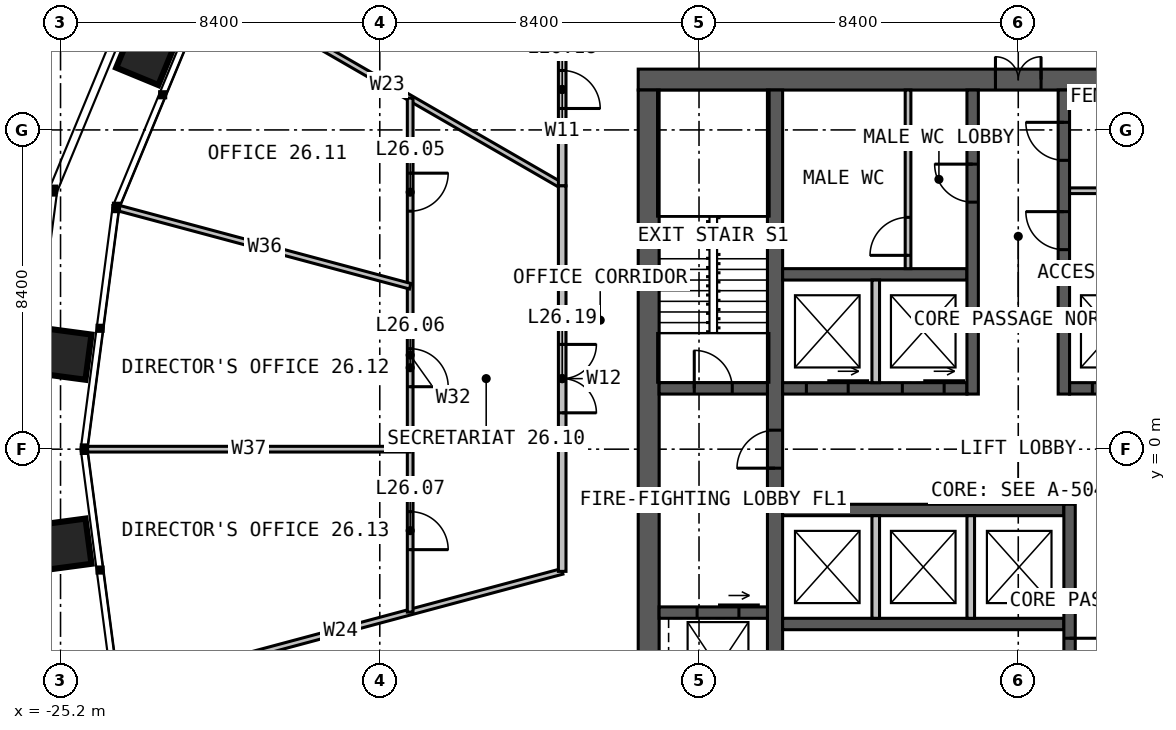
"""IFC4 building model, lengths in metres.
Left out: names, types, materials, properties, quantities, classifications, styles, units other than length and angle.
Written with IfcOpenShell. Run it as: python <this file> out.ifc"""

import sys

from ifc_helpers import new_model, si_unit, direction, frame, frame_2d, origin, place, context, subcontext, project, spatial, rectangle, extrude, element, fill, save


model = new_model("IFC4")
c1 = context("Model", 3, precision=1e-05, world=origin(), true_north=direction((0.0, 1.0)))
c2 = subcontext(c1, "Body", "Model", "MODEL_VIEW")
j1 = project(units=[si_unit("LENGTHUNIT", "METRE"), si_unit("PLANEANGLEUNIT", "RADIAN")], contexts=[c1])
p1 = place(None, origin())
s1 = spatial("IfcSite", under=j1, at=p1, CompositionType="ELEMENT")
p2 = place(p1, origin())
s2 = spatial("IfcBuilding", under=s1, at=p2, CompositionType="ELEMENT")
p3 = place(p2, frame((0.0, 0.0, 110.0)))
s3 = spatial("IfcBuildingStorey", under=s2, at=p3, CompositionType="ELEMENT", Elevation=110.0)
p4 = place(p3, frame((-10.0, 9.725, 0.0), z_axis=(0.0, 0.0, 1.0), x_axis=(1.0, 0.0, 0.0)))
e1 = element("IfcWall", 1, at=p4, inside=s3, PredefinedType="SOLIDWALL", context=c2, shape_type="SweptSolid", body=[
    extrude(rectangle(XDim=20.0, YDim=0.55, at=frame_2d((10.0, 0.0))), origin(), (0.0, 0.0, 1.0), 4.0),
])
p5 = place(p4, frame((9.4, 0.0, 0.0)))
e2 = element("IfcOpeningElement", 2, at=p5, cuts=e1, PredefinedType="OPENING", context=c2, shape_type="SweptSolid", body=[
    extrude(rectangle(XDim=1.2, YDim=2.2, at=frame_2d((0.6, 1.1))), frame((0.0, 0.285, 0.0), z_axis=(0.0, -1.0, 0.0), x_axis=(1.0, 0.0, 0.0)), (0.0, 0.0, 1.0), 0.57),
])
p6 = place(p3, frame((-9.725, 9.45, 0.0), z_axis=(0.0, 0.0, 1.0), x_axis=(0.0, -1.0, 0.0)))
e3 = element("IfcWall", 3, at=p6, inside=s3, PredefinedType="SOLIDWALL", context=c2, shape_type="SweptSolid", body=[
    extrude(rectangle(XDim=18.9, YDim=0.55, at=frame_2d((9.45, 0.0))), origin(), (0.0, 0.0, 1.0), 4.0),
])
p7 = place(p3, frame((-6.4, -9.45, 0.0), z_axis=(0.0, 0.0, 1.0), x_axis=(0.0, 1.0, 0.0)))
e4 = element("IfcWall", 4, at=p7, inside=s3, PredefinedType="SOLIDWALL", context=c2, shape_type="SweptSolid", body=[
    extrude(rectangle(XDim=18.9, YDim=0.4, at=frame_2d((9.45, 0.0))), origin(), (0.0, 0.0, 1.0), 4.0),
])
p8 = place(p7, frame((8.95, 0.0, 0.0)))
e5 = element("IfcOpeningElement", 5, at=p8, cuts=e4, PredefinedType="OPENING", context=c2, shape_type="SweptSolid", body=[
    extrude(rectangle(XDim=1.0, YDim=2.2, at=frame_2d((0.5, 1.1))), frame((0.0, 0.21, 0.0), z_axis=(0.0, -1.0, 0.0), x_axis=(1.0, 0.0, 0.0)), (0.0, 0.0, 1.0), 0.42),
])
p9 = place(p3, frame((-6.2, 1.6, 0.0), z_axis=(0.0, 0.0, 1.0), x_axis=(1.0, 0.0, 0.0)))
e6 = element("IfcWall", 6, at=p9, inside=s3, PredefinedType="SOLIDWALL", context=c2, shape_type="SweptSolid", body=[
    extrude(rectangle(XDim=4.85, YDim=0.3, at=frame_2d((2.425, 0.0))), origin(), (0.0, 0.0, 1.0), 4.0),
])
p10 = place(p9, frame((0.625, 0.0, 0.0)))
e7 = element("IfcOpeningElement", 7, at=p10, cuts=e6, PredefinedType="OPENING", context=c2, shape_type="SweptSolid", body=[
    extrude(rectangle(XDim=1.1, YDim=2.2, at=frame_2d((0.55, 1.1))), frame((0.0, 0.16, 0.0), z_axis=(0.0, -1.0, 0.0), x_axis=(1.0, 0.0, 0.0)), (0.0, 0.0, 1.0), 0.32),
])
p11 = place(p9, frame((3.15, 0.0, 0.0)))
e8 = element("IfcOpeningElement", 8, at=p11, cuts=e6, PredefinedType="OPENING", context=c2, shape_type="SweptSolid", body=[
    extrude(rectangle(XDim=1.1, YDim=2.2, at=frame_2d((0.55, 1.1))), frame((0.0, 0.16, 0.0), z_axis=(0.0, -1.0, 0.0), x_axis=(1.0, 0.0, 0.0)), (0.0, 0.0, 1.0), 0.32),
])
p12 = place(p3, frame((1.35, 1.6, 0.0), z_axis=(0.0, 0.0, 1.0), x_axis=(1.0, 0.0, 0.0)))
e9 = element("IfcWall", 9, at=p12, inside=s3, PredefinedType="SOLIDWALL", context=c2, shape_type="SweptSolid", body=[
    extrude(rectangle(XDim=4.85, YDim=0.3, at=frame_2d((2.425, 0.0))), origin(), (0.0, 0.0, 1.0), 4.0),
])
p13 = place(p12, frame((0.6, 0.0, 0.0)))
e10 = element("IfcOpeningElement", 10, at=p13, cuts=e9, PredefinedType="OPENING", context=c2, shape_type="SweptSolid", body=[
    extrude(rectangle(XDim=1.1, YDim=2.2, at=frame_2d((0.55, 1.1))), frame((0.0, 0.16, 0.0), z_axis=(0.0, -1.0, 0.0), x_axis=(1.0, 0.0, 0.0)), (0.0, 0.0, 1.0), 0.32),
])
p14 = place(p12, frame((3.125, 0.0, 0.0)))
e11 = element("IfcOpeningElement", 11, at=p14, cuts=e9, PredefinedType="OPENING", context=c2, shape_type="SweptSolid", body=[
    extrude(rectangle(XDim=1.1, YDim=2.2, at=frame_2d((0.55, 1.1))), frame((0.0, 0.16, 0.0), z_axis=(0.0, -1.0, 0.0), x_axis=(1.0, 0.0, 0.0)), (0.0, 0.0, 1.0), 0.32),
])
for number, where, z_axis, x_axis in (
    (12, (-6.2, 4.6, 0.0), (0.0, 0.0, 1.0), (1.0, 0.0, 0.0)),
    (13, (1.35, 4.6, 0.0), (0.0, 0.0, 1.0), (1.0, 0.0, 0.0)),
):
    element("IfcWall", number, at=place(p3, frame(where, z_axis=z_axis, x_axis=x_axis)), inside=s3, PredefinedType="SOLIDWALL", context=c2, shape_type="SweptSolid", body=[
        extrude(rectangle(XDim=4.85, YDim=0.3, at=frame_2d((2.425, 0.0))), origin(), (0.0, 0.0, 1.0), 4.0),
    ])
p15 = place(p3, frame((-1.2, 1.45, 0.0), z_axis=(0.0, 0.0, 1.0), x_axis=(0.0, 1.0, 0.0)))
e14 = element("IfcWall", 14, at=p15, inside=s3, PredefinedType="SOLIDWALL", context=c2, shape_type="SweptSolid", body=[
    extrude(rectangle(XDim=8.0, YDim=0.3, at=frame_2d((4.0, 0.0))), origin(), (0.0, 0.0, 1.0), 4.0),
])
p16 = place(p15, frame((5.05, 0.0, 0.0)))
e15 = element("IfcOpeningElement", 15, at=p16, cuts=e14, PredefinedType="OPENING", context=c2, shape_type="SweptSolid", body=[
    extrude(rectangle(XDim=1.0, YDim=2.2, at=frame_2d((0.5, 1.1))), frame((0.0, 0.16, 0.0), z_axis=(0.0, -1.0, 0.0), x_axis=(1.0, 0.0, 0.0)), (0.0, 0.0, 1.0), 0.32),
])
p17 = place(p3, frame((1.2, 1.45, 0.0), z_axis=(0.0, 0.0, 1.0), x_axis=(0.0, 1.0, 0.0)))
e16 = element("IfcWall", 16, at=p17, inside=s3, PredefinedType="SOLIDWALL", context=c2, shape_type="SweptSolid", body=[
    extrude(rectangle(XDim=8.0, YDim=0.3, at=frame_2d((4.0, 0.0))), origin(), (0.0, 0.0, 1.0), 4.0),
])
p18 = place(p17, frame((3.8, 0.0, 0.0)))
e17 = element("IfcOpeningElement", 17, at=p18, cuts=e16, PredefinedType="OPENING", context=c2, shape_type="SweptSolid", body=[
    extrude(rectangle(XDim=1.0, YDim=2.2, at=frame_2d((0.5, 1.1))), frame((0.0, 0.16, 0.0), z_axis=(0.0, -1.0, 0.0), x_axis=(1.0, 0.0, 0.0)), (0.0, 0.0, 1.0), 0.32),
])
p19 = place(p17, frame((6.15, 0.0, 0.0)))
e18 = element("IfcOpeningElement", 18, at=p19, cuts=e16, PredefinedType="OPENING", context=c2, shape_type="SweptSolid", body=[
    extrude(rectangle(XDim=1.0, YDim=2.2, at=frame_2d((0.5, 1.1))), frame((0.0, 0.16, 0.0), z_axis=(0.0, -1.0, 0.0), x_axis=(1.0, 0.0, 0.0)), (0.0, 0.0, 1.0), 0.32),
])
for number, where, z_axis, x_axis in (
    (19, (-6.2, -1.6, 0.0), (0.0, 0.0, 1.0), (1.0, 0.0, 0.0)),
    (20, (-6.2, -4.6, 0.0), (0.0, 0.0, 1.0), (1.0, 0.0, 0.0)),
):
    element("IfcWall", number, at=place(p3, frame(where, z_axis=z_axis, x_axis=x_axis)), inside=s3, PredefinedType="SOLIDWALL", context=c2, shape_type="SweptSolid", body=[
        extrude(rectangle(XDim=7.4, YDim=0.3, at=frame_2d((3.7, 0.0))), origin(), (0.0, 0.0, 1.0), 4.0),
    ])
p20 = place(p3, frame((1.35, -1.45, 0.0), z_axis=(0.0, 0.0, 1.0), x_axis=(0.0, -1.0, 0.0)))
e21 = element("IfcWall", 21, at=p20, inside=s3, PredefinedType="SOLIDWALL", context=c2, shape_type="SweptSolid", body=[
    extrude(rectangle(XDim=8.0, YDim=0.3, at=frame_2d((4.0, 0.0))), origin(), (0.0, 0.0, 1.0), 4.0),
])
p21 = place(p20, frame((5.925, 0.0, 0.0)))
e22 = element("IfcOpeningElement", 22, at=p21, cuts=e21, PredefinedType="OPENING", context=c2, shape_type="SweptSolid", body=[
    extrude(rectangle(XDim=1.0, YDim=2.2, at=frame_2d((0.5, 1.1))), frame((0.0, 0.16, 0.0), z_axis=(0.0, -1.0, 0.0), x_axis=(1.0, 0.0, 0.0)), (0.0, 0.0, 1.0), 0.32),
])
p22 = place(p20, frame((3.525, 0.0, 0.0)))
e23 = element("IfcOpeningElement", 23, at=p22, cuts=e21, PredefinedType="OPENING", context=c2, shape_type="SweptSolid", body=[
    extrude(rectangle(XDim=0.9, YDim=2.2, at=frame_2d((0.45, 1.1))), frame((0.0, 0.16, 0.0), z_axis=(0.0, -1.0, 0.0), x_axis=(1.0, 0.0, 0.0)), (0.0, 0.0, 1.0), 0.32),
])
p23 = place(p3, frame((-9.45, 1.6, 0.0), z_axis=(0.0, 0.0, 1.0), x_axis=(1.0, 0.0, 0.0)))
e24 = element("IfcWall", 24, at=p23, inside=s3, PredefinedType="SOLIDWALL", context=c2, shape_type="SweptSolid", body=[
    extrude(rectangle(XDim=2.85, YDim=0.3, at=frame_2d((1.425, 0.0))), origin(), (0.0, 0.0, 1.0), 4.0),
])
p24 = place(p23, frame((0.925, 0.0, 0.0)))
e25 = element("IfcOpeningElement", 25, at=p24, cuts=e24, PredefinedType="OPENING", context=c2, shape_type="SweptSolid", body=[
    extrude(rectangle(XDim=1.0, YDim=2.2, at=frame_2d((0.5, 1.1))), frame((0.0, 0.16, 0.0), z_axis=(0.0, -1.0, 0.0), x_axis=(1.0, 0.0, 0.0)), (0.0, 0.0, 1.0), 0.32),
])
p25 = place(p3, frame((-9.45, -4.3, 0.0), z_axis=(0.0, 0.0, 1.0), x_axis=(1.0, 0.0, 0.0)))
e26 = element("IfcWall", 26, at=p25, inside=s3, PredefinedType="SOLIDWALL", context=c2, shape_type="SweptSolid", body=[
    extrude(rectangle(XDim=2.85, YDim=0.3, at=frame_2d((1.425, 0.0))), origin(), (0.0, 0.0, 1.0), 4.0),
])
p26 = place(p25, frame((1.0, 0.0, 0.0)))
e27 = element("IfcOpeningElement", 27, at=p26, cuts=e26, PredefinedType="OPENING", context=c2, shape_type="SweptSolid", body=[
    extrude(rectangle(XDim=1.1, YDim=2.2, at=frame_2d((0.55, 1.1))), frame((0.0, 0.16, 0.0), z_axis=(0.0, -1.0, 0.0), x_axis=(1.0, 0.0, 0.0)), (0.0, 0.0, 1.0), 0.32),
])
for number, where, z_axis, x_axis in (
    (28, (-3.75, 1.75, 0.0), (0.0, 0.0, 1.0), (0.0, 1.0, 0.0)),
    (29, (-3.75, -1.75, 0.0), (0.0, 0.0, 1.0), (0.0, -1.0, 0.0)),
    (30, (-1.25, -1.75, 0.0), (0.0, 0.0, 1.0), (0.0, -1.0, 0.0)),
):
    element("IfcWall", number, at=place(p3, frame(where, z_axis=z_axis, x_axis=x_axis)), inside=s3, PredefinedType="SOLIDWALL", context=c2, shape_type="SweptSolid", body=[
        extrude(rectangle(XDim=2.7, YDim=0.2, at=frame_2d((1.35, 0.0))), origin(), (0.0, 0.0, 1.0), 3.75),
    ])
p27 = place(p3, frame((1.35, 6.8, 0.0), z_axis=(0.0, 0.0, 1.0), x_axis=(1.0, 0.0, 0.0)))
e31 = element("IfcWall", 31, at=p27, inside=s3, PredefinedType="PARTITIONING", context=c2, shape_type="SweptSolid", body=[
    extrude(rectangle(XDim=4.85, YDim=0.15, at=frame_2d((2.425, 0.0))), origin(), (0.0, 0.0, 1.0), 3.75),
])
p28 = place(p27, frame((3.15, 0.0, 0.0)))
e32 = element("IfcOpeningElement", 32, at=p28, cuts=e31, PredefinedType="OPENING", context=c2, shape_type="SweptSolid", body=[
    extrude(rectangle(XDim=0.9, YDim=2.2, at=frame_2d((0.45, 1.1))), frame((0.0, 0.085, 0.0), z_axis=(0.0, -1.0, 0.0), x_axis=(1.0, 0.0, 0.0)), (0.0, 0.0, 1.0), 0.17),
])
p29 = place(p3, frame((-2.9, 4.75, 0.0), z_axis=(0.0, 0.0, 1.0), x_axis=(0.0, 1.0, 0.0)))
e33 = element("IfcWall", 33, at=p29, inside=s3, PredefinedType="PARTITIONING", context=c2, shape_type="SweptSolid", body=[
    extrude(rectangle(XDim=4.7, YDim=0.15, at=frame_2d((2.35, 0.0))), origin(), (0.0, 0.0, 1.0), 3.75),
])
p30 = place(p29, frame((0.35, 0.0, 0.0)))
e34 = element("IfcOpeningElement", 34, at=p30, cuts=e33, PredefinedType="OPENING", context=c2, shape_type="SweptSolid", body=[
    extrude(rectangle(XDim=1.0, YDim=2.2, at=frame_2d((0.5, 1.1))), frame((0.0, 0.085, 0.0), z_axis=(0.0, -1.0, 0.0), x_axis=(1.0, 0.0, 0.0)), (0.0, 0.0, 1.0), 0.17),
])
p31 = place(p3, frame((-12.0, 6.928, 0.0), z_axis=(0.0, 0.0, 1.0), x_axis=(-0.866024197053, 0.500002090115, 0.0)))
e35 = element("IfcWall", 35, at=p31, inside=s3, PredefinedType="PARTITIONING", context=c2, shape_type="SweptSolid", body=[
    extrude(rectangle(XDim=10.631, YDim=0.15, at=frame_2d((5.315, 0.0))), origin(), (0.0, 0.0, 1.0), 2.79),
])
p32 = place(p3, frame((-12.0, -3.215, 0.0), z_axis=(0.0, 0.0, 1.0), x_axis=(-0.965926913807, -0.258814986396, 0.0)))
e36 = element("IfcWall", 36, at=p32, inside=s3, PredefinedType="PARTITIONING", context=c2, shape_type="SweptSolid", body=[
    extrude(rectangle(XDim=12.064, YDim=0.15, at=frame_2d((6.032, 0.0))), origin(), (0.0, 0.0, 1.0), 2.79),
])
p33 = place(p3, frame((-12.0, 12.0, 0.0), z_axis=(0.0, 0.0, 1.0), x_axis=(0.0, -1.0, 0.0)))
e37 = element("IfcWall", 37, at=p33, inside=s3, PredefinedType="PARTITIONING", context=c2, shape_type="SweptSolid", body=[
    extrude(rectangle(XDim=5.072, YDim=0.2, at=frame_2d((2.536, 0.0))), origin(), (0.0, 0.0, 1.0), 3.8),
])
p34 = place(p33, frame((2.036, 0.0, 0.0)))
e38 = element("IfcOpeningElement", 38, at=p34, cuts=e37, PredefinedType="OPENING", context=c2, shape_type="SweptSolid", body=[
    extrude(rectangle(XDim=1.0, YDim=2.2, at=frame_2d((0.5, 1.1))), frame((0.0, 0.11, 0.0), z_axis=(0.0, -1.0, 0.0), x_axis=(1.0, 0.0, 0.0)), (0.0, 0.0, 1.0), 0.22),
])
p35 = place(p3, frame((-16.0, 9.238, 0.0), z_axis=(0.0, 0.0, 1.0), x_axis=(0.0, -1.0, 0.0)))
e39 = element("IfcWall", 39, at=p35, inside=s3, PredefinedType="PARTITIONING", context=c2, shape_type="SweptSolid", body=[
    extrude(rectangle(XDim=13.525, YDim=0.15, at=frame_2d((6.762, 0.0))), origin(), (0.0, 0.0, 1.0), 2.79),
])
p36 = place(p35, frame((1.975, 0.0, 0.0)))
e40 = element("IfcOpeningElement", 40, at=p36, cuts=e39, PredefinedType="OPENING", context=c2, shape_type="SweptSolid", body=[
    extrude(rectangle(XDim=1.0, YDim=2.2, at=frame_2d((0.5, 1.1))), frame((0.0, 0.085, 0.0), z_axis=(0.0, -1.0, 0.0), x_axis=(1.0, 0.0, 0.0)), (0.0, 0.0, 1.0), 0.17),
])
p37 = place(p35, frame((6.594, 0.0, 0.0)))
e41 = element("IfcOpeningElement", 41, at=p37, cuts=e39, PredefinedType="OPENING", context=c2, shape_type="SweptSolid", body=[
    extrude(rectangle(XDim=1.0, YDim=2.2, at=frame_2d((0.5, 1.1))), frame((0.0, 0.085, 0.0), z_axis=(0.0, -1.0, 0.0), x_axis=(1.0, 0.0, 0.0)), (0.0, 0.0, 1.0), 0.17),
])
p38 = place(p35, frame((10.881, 0.0, 0.0)))
e42 = element("IfcOpeningElement", 42, at=p38, cuts=e39, PredefinedType="OPENING", context=c2, shape_type="SweptSolid", body=[
    extrude(rectangle(XDim=1.0, YDim=2.2, at=frame_2d((0.5, 1.1))), frame((0.0, 0.085, 0.0), z_axis=(0.0, -1.0, 0.0), x_axis=(1.0, 0.0, 0.0)), (0.0, 0.0, 1.0), 0.17),
])
p39 = place(p3, frame((-16.0, 4.287, 0.0), z_axis=(0.0, 0.0, 1.0), x_axis=(-0.965926869261, 0.258815152648, 0.0)))
e43 = element("IfcWall", 43, at=p39, inside=s3, PredefinedType="PARTITIONING", context=c2, shape_type="SweptSolid", body=[
    extrude(rectangle(XDim=7.923, YDim=0.15, at=frame_2d((3.961, 0.0))), origin(), (0.0, 0.0, 1.0), 2.79),
])
p40 = place(p3, frame((-16.0, 0.0, 0.0), z_axis=(0.0, 0.0, 1.0), x_axis=(-1.0, 0.0, 0.0)))
e44 = element("IfcWall", 44, at=p40, inside=s3, PredefinedType="PARTITIONING", context=c2, shape_type="SweptSolid", body=[
    extrude(rectangle(XDim=8.487, YDim=0.15, at=frame_2d((4.244, 0.0))), origin(), (0.0, 0.0, 1.0), 2.79),
])
p41 = place(p3, frame((-12.0, 6.928, 0.0), z_axis=(0.0, 0.0, 1.0), x_axis=(0.0, -1.0, 0.0)))
e45 = element("IfcWall", 45, at=p41, inside=s3, PredefinedType="PARTITIONING", context=c2, shape_type="SweptSolid", body=[
    extrude(rectangle(XDim=10.144, YDim=0.2, at=frame_2d((5.072, 0.0))), origin(), (0.0, 0.0, 1.0), 3.8),
])
p42 = place(p41, frame((4.172, 0.0, 0.0)))
e46 = element("IfcOpeningElement", 46, at=p42, cuts=e45, PredefinedType="OPENING", context=c2, shape_type="SweptSolid", body=[
    extrude(rectangle(XDim=1.8, YDim=2.2, at=frame_2d((0.9, 1.1))), frame((0.0, 0.11, 0.0), z_axis=(0.0, -1.0, 0.0), x_axis=(1.0, 0.0, 0.0)), (0.0, 0.0, 1.0), 0.22),
])
p43 = place(p5, origin())
e47 = element("IfcDoor", 47, at=p43, inside=s3, OperationType="DOUBLE_DOOR_SINGLE_SWING", PredefinedType="DOOR", context=c2, shape_type="SweptSolid", body=[
    extrude(rectangle(XDim=1.2, YDim=2.2, at=frame_2d((0.6, 1.1))), frame((0.0, 0.025, 0.0), z_axis=(0.0, -1.0, 0.0), x_axis=(1.0, 0.0, 0.0)), (0.0, 0.0, 1.0), 0.05),
])
fill(e2, e47)
p44 = place(p8, origin())
e48 = element("IfcDoor", 48, at=p44, inside=s3, OperationType="SINGLE_SWING_LEFT", PredefinedType="DOOR", context=c2, shape_type="SweptSolid", body=[
    extrude(rectangle(XDim=1.0, YDim=2.2, at=frame_2d((0.5, 1.1))), frame((0.0, 0.025, 0.0), z_axis=(0.0, -1.0, 0.0), x_axis=(1.0, 0.0, 0.0)), (0.0, 0.0, 1.0), 0.05),
])
fill(e5, e48)
p45 = place(p24, origin())
e49 = element("IfcDoor", 49, at=p45, inside=s3, OperationType="SINGLE_SWING_LEFT", PredefinedType="DOOR", context=c2, shape_type="SweptSolid", body=[
    extrude(rectangle(XDim=1.0, YDim=2.2, at=frame_2d((0.5, 1.1))), frame((0.0, 0.025, 0.0), z_axis=(0.0, -1.0, 0.0), x_axis=(1.0, 0.0, 0.0)), (0.0, 0.0, 1.0), 0.05),
])
fill(e25, e49)
p46 = place(p16, origin())
e50 = element("IfcDoor", 50, at=p46, inside=s3, OperationType="SINGLE_SWING_RIGHT", PredefinedType="DOOR", context=c2, shape_type="SweptSolid", body=[
    extrude(rectangle(XDim=1.0, YDim=2.2, at=frame_2d((0.5, 1.1))), frame((0.0, 0.025, 0.0), z_axis=(0.0, -1.0, 0.0), x_axis=(1.0, 0.0, 0.0)), (0.0, 0.0, 1.0), 0.05),
])
fill(e15, e50)
p47 = place(p18, origin())
e51 = element("IfcDoor", 51, at=p47, inside=s3, OperationType="SINGLE_SWING_RIGHT", PredefinedType="DOOR", context=c2, shape_type="SweptSolid", body=[
    extrude(rectangle(XDim=1.0, YDim=2.2, at=frame_2d((0.5, 1.1))), frame((0.0, 0.025, 0.0), z_axis=(0.0, -1.0, 0.0), x_axis=(1.0, 0.0, 0.0)), (0.0, 0.0, 1.0), 0.05),
])
fill(e17, e51)
p48 = place(p19, origin())
e52 = element("IfcDoor", 52, at=p48, inside=s3, OperationType="SINGLE_SWING_RIGHT", PredefinedType="DOOR", context=c2, shape_type="SweptSolid", body=[
    extrude(rectangle(XDim=1.0, YDim=2.2, at=frame_2d((0.5, 1.1))), frame((0.0, 0.025, 0.0), z_axis=(0.0, -1.0, 0.0), x_axis=(1.0, 0.0, 0.0)), (0.0, 0.0, 1.0), 0.05),
])
fill(e18, e52)
p49 = place(p22, origin())
e53 = element("IfcDoor", 53, at=p49, inside=s3, OperationType="SINGLE_SWING_LEFT", PredefinedType="DOOR", context=c2, shape_type="SweptSolid", body=[
    extrude(rectangle(XDim=0.9, YDim=2.2, at=frame_2d((0.45, 1.1))), frame((0.0, 0.025, 0.0), z_axis=(0.0, -1.0, 0.0), x_axis=(1.0, 0.0, 0.0)), (0.0, 0.0, 1.0), 0.05),
])
fill(e23, e53)
p50 = place(p30, origin())
e54 = element("IfcDoor", 54, at=p50, inside=s3, OperationType="SINGLE_SWING_LEFT", PredefinedType="DOOR", context=c2, shape_type="SweptSolid", body=[
    extrude(rectangle(XDim=1.0, YDim=2.2, at=frame_2d((0.5, 1.1))), frame((0.0, 0.025, 0.0), z_axis=(0.0, -1.0, 0.0), x_axis=(1.0, 0.0, 0.0)), (0.0, 0.0, 1.0), 0.05),
])
fill(e34, e54)
p51 = place(p10, origin())
e55 = element("IfcDoor", 55, at=p51, inside=s3, OperationType="SLIDING_TO_LEFT", PredefinedType="DOOR", context=c2, shape_type="SweptSolid", body=[
    extrude(rectangle(XDim=1.1, YDim=2.2, at=frame_2d((0.55, 1.1))), frame((0.0, 0.025, 0.0), z_axis=(0.0, -1.0, 0.0), x_axis=(1.0, 0.0, 0.0)), (0.0, 0.0, 1.0), 0.05),
])
fill(e7, e55)
p52 = place(p11, origin())
e56 = element("IfcDoor", 56, at=p52, inside=s3, OperationType="SLIDING_TO_LEFT", PredefinedType="DOOR", context=c2, shape_type="SweptSolid", body=[
    extrude(rectangle(XDim=1.1, YDim=2.2, at=frame_2d((0.55, 1.1))), frame((0.0, 0.025, 0.0), z_axis=(0.0, -1.0, 0.0), x_axis=(1.0, 0.0, 0.0)), (0.0, 0.0, 1.0), 0.05),
])
fill(e8, e56)
p53 = place(p13, origin())
e57 = element("IfcDoor", 57, at=p53, inside=s3, OperationType="SLIDING_TO_LEFT", PredefinedType="DOOR", context=c2, shape_type="SweptSolid", body=[
    extrude(rectangle(XDim=1.1, YDim=2.2, at=frame_2d((0.55, 1.1))), frame((0.0, 0.025, 0.0), z_axis=(0.0, -1.0, 0.0), x_axis=(1.0, 0.0, 0.0)), (0.0, 0.0, 1.0), 0.05),
])
fill(e10, e57)
p54 = place(p26, origin())
e58 = element("IfcDoor", 58, at=p54, inside=s3, OperationType="SLIDING_TO_LEFT", PredefinedType="DOOR", context=c2, shape_type="SweptSolid", body=[
    extrude(rectangle(XDim=1.1, YDim=2.2, at=frame_2d((0.55, 1.1))), frame((0.0, 0.025, 0.0), z_axis=(0.0, -1.0, 0.0), x_axis=(1.0, 0.0, 0.0)), (0.0, 0.0, 1.0), 0.05),
])
fill(e27, e58)
p55 = place(p34, origin())
e59 = element("IfcDoor", 59, at=p55, inside=s3, OperationType="SINGLE_SWING_RIGHT", PredefinedType="DOOR", context=c2, shape_type="SweptSolid", body=[
    extrude(rectangle(XDim=1.0, YDim=2.2, at=frame_2d((0.5, 1.1))), frame((0.0, 0.025, 0.0), z_axis=(0.0, -1.0, 0.0), x_axis=(1.0, 0.0, 0.0)), (0.0, 0.0, 1.0), 0.05),
])
fill(e38, e59)
p56 = place(p36, origin())
e60 = element("IfcDoor", 60, at=p56, inside=s3, OperationType="SINGLE_SWING_LEFT", PredefinedType="DOOR", context=c2, shape_type="SweptSolid", body=[
    extrude(rectangle(XDim=1.0, YDim=2.2, at=frame_2d((0.5, 1.1))), frame((0.0, 0.025, 0.0), z_axis=(0.0, -1.0, 0.0), x_axis=(1.0, 0.0, 0.0)), (0.0, 0.0, 1.0), 0.05),
])
fill(e40, e60)
p57 = place(p37, origin())
e61 = element("IfcDoor", 61, at=p57, inside=s3, OperationType="SINGLE_SWING_RIGHT", PredefinedType="DOOR", context=c2, shape_type="SweptSolid", body=[
    extrude(rectangle(XDim=1.0, YDim=2.2, at=frame_2d((0.5, 1.1))), frame((0.0, 0.025, 0.0), z_axis=(0.0, -1.0, 0.0), x_axis=(1.0, 0.0, 0.0)), (0.0, 0.0, 1.0), 0.05),
])
fill(e41, e61)
p58 = place(p38, origin())
e62 = element("IfcDoor", 62, at=p58, inside=s3, OperationType="SINGLE_SWING_RIGHT", PredefinedType="DOOR", context=c2, shape_type="SweptSolid", body=[
    extrude(rectangle(XDim=1.0, YDim=2.2, at=frame_2d((0.5, 1.1))), frame((0.0, 0.025, 0.0), z_axis=(0.0, -1.0, 0.0), x_axis=(1.0, 0.0, 0.0)), (0.0, 0.0, 1.0), 0.05),
])
fill(e42, e62)
p59 = place(p42, origin())
e63 = element("IfcDoor", 63, at=p59, inside=s3, OperationType="DOUBLE_DOOR_SINGLE_SWING", PredefinedType="DOOR", context=c2, shape_type="SweptSolid", body=[
    extrude(rectangle(XDim=1.8, YDim=2.2, at=frame_2d((0.9, 1.1))), frame((0.0, 0.025, 0.0), z_axis=(0.0, -1.0, 0.0), x_axis=(1.0, 0.0, 0.0)), (0.0, 0.0, 1.0), 0.05),
])
fill(e46, e63)
save(model, sys.argv[1])
